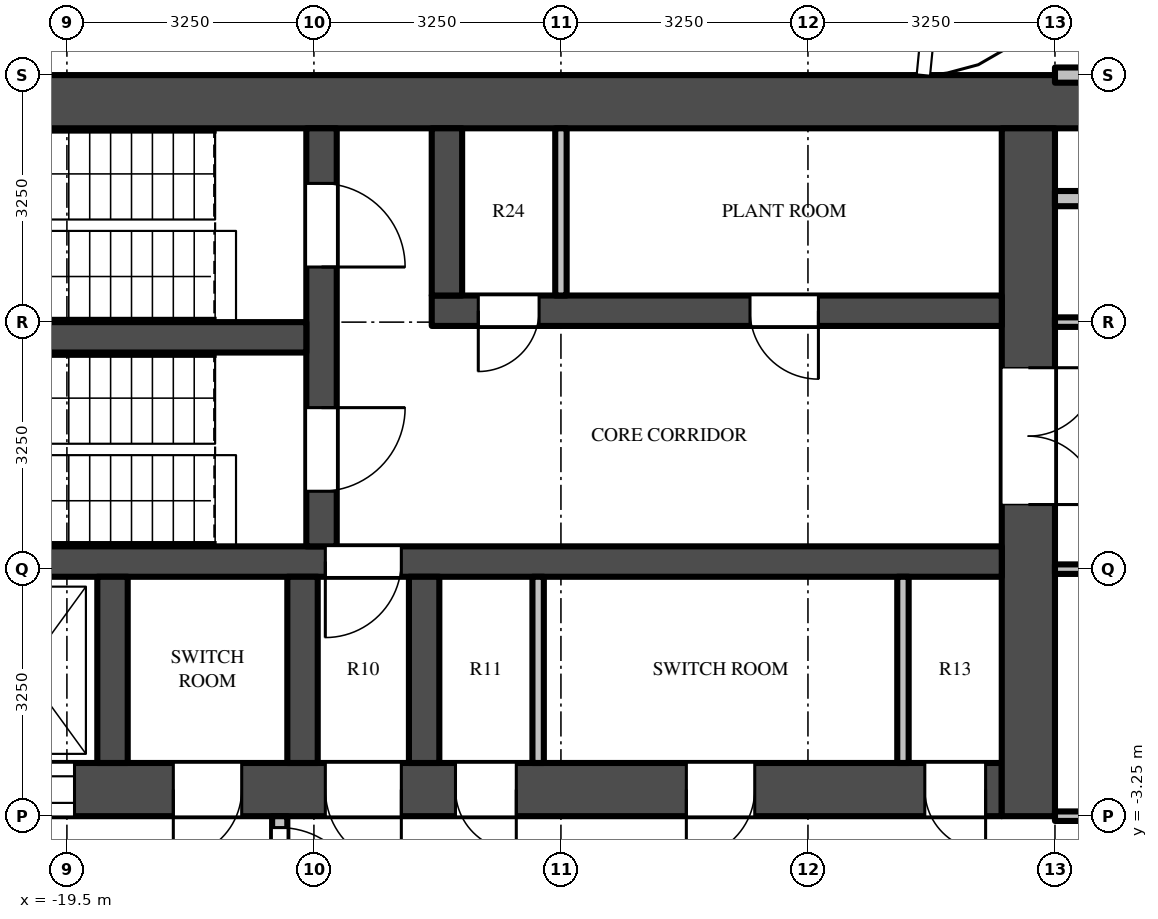
"""IFC4 building model, lengths in metres.
Left out: names, types, materials, properties, quantities, classifications, styles, units other than length and angle.
Written with IfcOpenShell. Run it as: python <this file> out.ifc"""

import sys

from ifc_helpers import new_model, si_unit, direction, frame, frame_2d, origin, place, context, subcontext, project, spatial, rectangle, extrude, source, transform, mapped, element, fill, save


model = new_model("IFC4")
c1 = context("Model", 3, precision=1e-05, world=origin(), true_north=direction((0.0, 1.0)))
c2 = subcontext(c1, "Body", "Model", "MODEL_VIEW")
j1 = project(units=[si_unit("LENGTHUNIT", "METRE"), si_unit("PLANEANGLEUNIT", "RADIAN")], contexts=[c1])
p1 = place(None, origin())
s1 = spatial("IfcSite", under=j1, at=p1, CompositionType="ELEMENT")
p2 = place(p1, origin())
s2 = spatial("IfcBuilding", under=s1, at=p2, CompositionType="ELEMENT")
p3 = place(p2, frame((0.0, 0.0, 342.1)))
s3 = spatial("IfcBuildingStorey", under=s2, at=p3, CompositionType="ELEMENT", Elevation=342.1)
m1 = source(origin(), c2, "Body", "SweptSolid", [
    extrude(rectangle(XDim=16.7, YDim=0.7, at=frame_2d((8.35, 0.0))), origin(), (0.0, 0.0, 1.0), 3.75),
])
p4 = place(p3, frame((-6.05, 6.15, 0.0), z_axis=(0.0, 0.0, 1.0), x_axis=(-1.0, 0.0, 0.0)))
e1 = element("IfcWall", 1, at=p4, inside=s3, PredefinedType="SHEAR", context=c2, shape_type="MappedRepresentation", body=[
    mapped(m1, transform((0.0, 0.0, 0.0))),
])
m2 = source(origin(), c2, "Body", "SweptSolid", [
    extrude(rectangle(XDim=14.85, YDim=0.7, at=frame_2d((7.425, 0.0))), origin(), (0.0, 0.0, 1.0), 3.75),
])
p5 = place(p3, frame((-7.2, -2.9, 0.0), z_axis=(0.0, 0.0, 1.0), x_axis=(-1.0, 0.0, 0.0)))
e2 = element("IfcWall", 2, at=p5, inside=s3, PredefinedType="SHEAR", context=c2, shape_type="MappedRepresentation", body=[
    mapped(m2, transform((0.0, 0.0, 0.0))),
])
m3 = source(origin(), c2, "Body", "SweptSolid", [
    extrude(rectangle(XDim=1.3, YDim=2.1, at=frame_2d((0.65, 1.05))), frame((0.0, 0.36, 0.0), z_axis=(0.0, -1.0, 0.0), x_axis=(1.0, 0.0, 0.0)), (0.0, 0.0, 1.0), 0.72),
])
p6 = place(p5, frame((12.2, 0.0, 0.0)))
e3 = element("IfcOpeningElement", 3, at=p6, cuts=e2, PredefinedType="OPENING", context=c2, shape_type="MappedRepresentation", body=[
    mapped(m3, transform((0.0, 0.0, 0.0))),
])
m4 = source(origin(), c2, "Body", "SweptSolid", [
    extrude(rectangle(XDim=1.0, YDim=2.1, at=frame_2d((0.5, 1.05))), frame((0.0, 0.36, 0.0), z_axis=(0.0, -1.0, 0.0), x_axis=(1.0, 0.0, 0.0)), (0.0, 0.0, 1.0), 0.72),
])
p7 = place(p5, frame((7.9, 0.0, 0.0)))
e4 = element("IfcOpeningElement", 4, at=p7, cuts=e2, PredefinedType="OPENING", context=c2, shape_type="MappedRepresentation", body=[
    mapped(m4, transform((0.0, 0.0, 0.0))),
])
m5 = source(origin(), c2, "Body", "SweptSolid", [
    extrude(rectangle(XDim=0.8, YDim=2.1, at=frame_2d((0.4, 1.05))), frame((0.0, 0.36, 0.0), z_axis=(0.0, -1.0, 0.0), x_axis=(1.0, 0.0, 0.0)), (0.0, 0.0, 1.0), 0.72),
])
p8 = place(p5, frame((0.212, 0.0, 0.0)))
e5 = element("IfcOpeningElement", 5, at=p8, cuts=e2, PredefinedType="OPENING", context=c2, shape_type="MappedRepresentation", body=[
    mapped(m5, transform((0.0, 0.0, 0.0))),
])
m6 = source(origin(), c2, "Body", "SweptSolid", [
    extrude(rectangle(XDim=0.9, YDim=2.1, at=frame_2d((0.45, 1.05))), frame((0.0, 0.36, 0.0), z_axis=(0.0, -1.0, 0.0), x_axis=(1.0, 0.0, 0.0)), (0.0, 0.0, 1.0), 0.72),
])
p9 = place(p5, frame((3.25, 0.0, 0.0)))
e6 = element("IfcOpeningElement", 6, at=p9, cuts=e2, PredefinedType="OPENING", context=c2, shape_type="MappedRepresentation", body=[
    mapped(m6, transform((0.0, 0.0, 0.0))),
])
p10 = place(p5, frame((6.387, 0.0, 0.0)))
e7 = element("IfcOpeningElement", 7, at=p10, cuts=e2, PredefinedType="OPENING", context=c2, shape_type="MappedRepresentation", body=[
    mapped(m5, transform((0.0, 0.0, 0.0))),
])
p11 = place(p5, frame((10.0, 0.0, 0.0)))
e8 = element("IfcOpeningElement", 8, at=p11, cuts=e2, PredefinedType="OPENING", context=c2, shape_type="MappedRepresentation", body=[
    mapped(m6, transform((0.0, 0.0, 0.0))),
])
m7 = source(origin(), c2, "Body", "SweptSolid", [
    extrude(rectangle(XDim=9.05, YDim=0.7, at=frame_2d((4.525, 0.0))), origin(), (0.0, 0.0, 1.0), 3.75),
])
p12 = place(p3, frame((-6.85, 5.8, 0.0), z_axis=(0.0, 0.0, 1.0), x_axis=(0.0, -1.0, 0.0)))
e9 = element("IfcWall", 9, at=p12, inside=s3, PredefinedType="SHEAR", context=c2, shape_type="MappedRepresentation", body=[
    mapped(m7, transform((0.0, 0.0, 0.0))),
])
m8 = source(origin(), c2, "Body", "SweptSolid", [
    extrude(rectangle(XDim=1.8, YDim=2.1, at=frame_2d((0.9, 1.05))), frame((0.0, 0.36, 0.0), z_axis=(0.0, -1.0, 0.0), x_axis=(1.0, 0.0, 0.0)), (0.0, 0.0, 1.0), 0.72),
])
p13 = place(p12, frame((3.15, 0.0, 0.0)))
e10 = element("IfcOpeningElement", 10, at=p13, cuts=e9, PredefinedType="OPENING", context=c2, shape_type="MappedRepresentation", body=[
    mapped(m8, transform((0.0, 0.0, 0.0))),
])
m9 = source(origin(), c2, "Body", "SweptSolid", [
    extrude(rectangle(XDim=7.5, YDim=0.4, at=frame_2d((3.75, 0.0))), origin(), (0.0, 0.0, 1.0), 3.75),
])
p14 = place(p3, frame((-7.2, 3.4, 0.0), z_axis=(0.0, 0.0, 1.0), x_axis=(-1.0, 0.0, 0.0)))
e11 = element("IfcWall", 11, at=p14, inside=s3, PredefinedType="SHEAR", context=c2, shape_type="MappedRepresentation", body=[
    mapped(m9, transform((0.0, 0.0, 0.0))),
])
m10 = source(origin(), c2, "Body", "SweptSolid", [
    extrude(rectangle(XDim=0.9, YDim=2.1, at=frame_2d((0.45, 1.05))), frame((0.0, 0.21, 0.0), z_axis=(0.0, -1.0, 0.0), x_axis=(1.0, 0.0, 0.0)), (0.0, 0.0, 1.0), 0.42),
])
p15 = place(p14, frame((2.413, 0.0, 0.0)))
e12 = element("IfcOpeningElement", 12, at=p15, cuts=e11, PredefinedType="OPENING", context=c2, shape_type="MappedRepresentation", body=[
    mapped(m10, transform((0.0, 0.0, 0.0))),
])
m11 = source(origin(), c2, "Body", "SweptSolid", [
    extrude(rectangle(XDim=0.8, YDim=2.1, at=frame_2d((0.4, 1.05))), frame((0.0, 0.21, 0.0), z_axis=(0.0, -1.0, 0.0), x_axis=(1.0, 0.0, 0.0)), (0.0, 0.0, 1.0), 0.42),
])
p16 = place(p14, frame((6.087, 0.0, 0.0)))
e13 = element("IfcOpeningElement", 13, at=p16, cuts=e11, PredefinedType="OPENING", context=c2, shape_type="MappedRepresentation", body=[
    mapped(m11, transform((0.0, 0.0, 0.0))),
])
m12 = source(origin(), c2, "Body", "SweptSolid", [
    extrude(rectangle(XDim=14.85, YDim=0.4, at=frame_2d((7.425, 0.0))), origin(), (0.0, 0.0, 1.0), 3.75),
])
p17 = place(p3, frame((-7.2, 0.1, 0.0), z_axis=(0.0, 0.0, 1.0), x_axis=(-1.0, 0.0, 0.0)))
e14 = element("IfcWall", 14, at=p17, inside=s3, PredefinedType="SHEAR", context=c2, shape_type="MappedRepresentation", body=[
    mapped(m12, transform((0.0, 0.0, 0.0))),
])
m13 = source(origin(), c2, "Body", "SweptSolid", [
    extrude(rectangle(XDim=1.0, YDim=2.1, at=frame_2d((0.5, 1.05))), frame((0.0, 0.21, 0.0), z_axis=(0.0, -1.0, 0.0), x_axis=(1.0, 0.0, 0.0)), (0.0, 0.0, 1.0), 0.42),
])
p18 = place(p17, frame((7.9, 0.0, 0.0)))
e15 = element("IfcOpeningElement", 15, at=p18, cuts=e14, PredefinedType="OPENING", context=c2, shape_type="MappedRepresentation", body=[
    mapped(m13, transform((0.0, 0.0, 0.0))),
])
m14 = source(origin(), c2, "Body", "SweptSolid", [
    extrude(rectangle(XDim=5.5, YDim=0.4, at=frame_2d((2.75, 0.0))), origin(), (0.0, 0.0, 1.0), 3.75),
])
p19 = place(p3, frame((-16.15, 5.8, 0.0), z_axis=(0.0, 0.0, 1.0), x_axis=(0.0, -1.0, 0.0)))
e16 = element("IfcWall", 16, at=p19, inside=s3, PredefinedType="SHEAR", context=c2, shape_type="MappedRepresentation", body=[
    mapped(m14, transform((0.0, 0.0, 0.0))),
])
m15 = source(origin(), c2, "Body", "SweptSolid", [
    extrude(rectangle(XDim=1.1, YDim=2.1, at=frame_2d((0.55, 1.05))), frame((0.0, 0.21, 0.0), z_axis=(0.0, -1.0, 0.0), x_axis=(1.0, 0.0, 0.0)), (0.0, 0.0, 1.0), 0.42),
])
p20 = place(p19, frame((0.725, 0.0, 0.0)))
e17 = element("IfcOpeningElement", 17, at=p20, cuts=e16, PredefinedType="OPENING", context=c2, shape_type="MappedRepresentation", body=[
    mapped(m15, transform((0.0, 0.0, 0.0))),
])
p21 = place(p19, frame((3.675, 0.0, 0.0)))
e18 = element("IfcOpeningElement", 18, at=p21, cuts=e16, PredefinedType="OPENING", context=c2, shape_type="MappedRepresentation", body=[
    mapped(m15, transform((0.0, 0.0, 0.0))),
])
m16 = source(origin(), c2, "Body", "SweptSolid", [
    extrude(rectangle(XDim=5.7, YDim=0.4, at=frame_2d((2.85, 0.0))), origin(), (0.0, 0.0, 1.0), 3.75),
])
p22 = place(p3, frame((-16.35, 3.05, 0.0), z_axis=(0.0, 0.0, 1.0), x_axis=(-1.0, 0.0, 0.0)))
e19 = element("IfcWall", 19, at=p22, inside=s3, PredefinedType="SHEAR", context=c2, shape_type="MappedRepresentation", body=[
    mapped(m16, transform((0.0, 0.0, 0.0))),
])
m17 = source(origin(), c2, "Body", "SweptSolid", [
    extrude(rectangle(XDim=2.2, YDim=0.4, at=frame_2d((1.1, 0.0))), origin(), (0.0, 0.0, 1.0), 3.75),
])
p23 = place(p3, frame((-14.5, 5.8, 0.0), z_axis=(0.0, 0.0, 1.0), x_axis=(0.0, -1.0, 0.0)))
e20 = element("IfcWall", 20, at=p23, inside=s3, PredefinedType="SHEAR", context=c2, shape_type="MappedRepresentation", body=[
    mapped(m17, transform((0.0, 0.0, 0.0))),
])
m18 = source(origin(), c2, "Body", "SweptSolid", [
    extrude(rectangle(XDim=2.45, YDim=0.4, at=frame_2d((1.225, 0.0))), origin(), (0.0, 0.0, 1.0), 3.75),
])
for number, where, z_axis, x_axis in (
    (21, (-14.8, -0.1, 0.0), (0.0, 0.0, 1.0), (0.0, -1.0, 0.0)),
    (22, (-16.4, -0.1, 0.0), (0.0, 0.0, 1.0), (0.0, -1.0, 0.0)),
    (23, (-18.9, -0.1, 0.0), (0.0, 0.0, 1.0), (0.0, -1.0, 0.0)),
):
    element("IfcWall", number, at=place(p3, frame(where, z_axis=z_axis, x_axis=x_axis)), inside=s3, PredefinedType="SHEAR", context=c2, shape_type="MappedRepresentation", body=[
        mapped(m18, transform((0.0, 0.0, 0.0))),
    ])
m19 = source(origin(), c2, "Body", "SweptSolid", [
    extrude(rectangle(XDim=3.25, YDim=0.2, at=frame_2d((1.625, 0.0))), origin(), (0.0, 0.0, 1.0), 3.75),
])
p24 = place(p3, frame((-16.7, -3.25, 0.0), z_axis=(0.0, 0.0, 1.0), x_axis=(0.0, -1.0, 0.0)))
e24 = element("IfcWall", 24, at=p24, inside=s3, PredefinedType="PARTITIONING", context=c2, shape_type="MappedRepresentation", body=[
    mapped(m19, transform((0.0, 0.0, 0.0))),
])
m20 = source(origin(), c2, "Body", "SweptSolid", [
    extrude(rectangle(XDim=1.1, YDim=2.1, at=frame_2d((0.55, 1.05))), frame((0.0, 0.11, 0.0), z_axis=(0.0, -1.0, 0.0), x_axis=(1.0, 0.0, 0.0)), (0.0, 0.0, 1.0), 0.22),
])
p25 = place(p24, frame((0.15, 0.0, 0.0)))
e25 = element("IfcOpeningElement", 25, at=p25, cuts=e24, PredefinedType="OPENING", context=c2, shape_type="MappedRepresentation", body=[
    mapped(m20, transform((0.0, 0.0, 0.0))),
])
m21 = source(origin(), c2, "Body", "SweptSolid", [
    extrude(rectangle(XDim=2.2, YDim=0.15, at=frame_2d((1.1, 0.0))), origin(), (0.0, 0.0, 1.0), 3.75),
])
p26 = place(p3, frame((-13.0, 5.8, 0.0), z_axis=(0.0, 0.0, 1.0), x_axis=(0.0, -1.0, 0.0)))
e26 = element("IfcWall", 26, at=p26, inside=s3, PredefinedType="PARTITIONING", context=c2, shape_type="MappedRepresentation", body=[
    mapped(m21, transform((0.0, 0.0, 0.0))),
])
m22 = source(origin(), c2, "Body", "SweptSolid", [
    extrude(rectangle(XDim=2.45, YDim=0.15, at=frame_2d((1.225, 0.0))), origin(), (0.0, 0.0, 1.0), 3.75),
])
for number, where, z_axis, x_axis in (
    (27, (-8.5, -0.1, 0.0), (0.0, 0.0, 1.0), (0.0, -1.0, 0.0)),
    (28, (-13.3, -0.1, 0.0), (0.0, 0.0, 1.0), (0.0, -1.0, 0.0)),
):
    element("IfcWall", number, at=place(p3, frame(where, z_axis=z_axis, x_axis=x_axis)), inside=s3, PredefinedType="PARTITIONING", context=c2, shape_type="MappedRepresentation", body=[
        mapped(m22, transform((0.0, 0.0, 0.0))),
    ])
m23 = source(origin(), c2, "Body", "SweptSolid", [
    extrude(rectangle(XDim=5.363, YDim=0.125, at=frame_2d((2.681, 0.0))), origin(), (0.0, 0.0, 1.0), 3.046),
])
p27 = place(p3, frame((-1.137, -3.25, 0.0), z_axis=(0.0, 0.0, 1.0), x_axis=(-1.0, 0.0, 0.0)))
e29 = element("IfcWall", 29, at=p27, inside=s3, PredefinedType="PARTITIONING", context=c2, shape_type="MappedRepresentation", body=[
    mapped(m23, transform((0.0, 0.0, 0.0))),
])
m24 = source(origin(), c2, "Body", "SweptSolid", [
    extrude(rectangle(XDim=1.0, YDim=2.1, at=frame_2d((0.5, 1.05))), frame((0.0, 0.073, 0.0), z_axis=(0.0, -1.0, 0.0), x_axis=(1.0, 0.0, 0.0)), (0.0, 0.0, 1.0), 0.145),
])
p28 = place(p27, frame((4.012, 0.0, 0.0)))
e30 = element("IfcOpeningElement", 30, at=p28, cuts=e29, PredefinedType="OPENING", context=c2, shape_type="MappedRepresentation", body=[
    mapped(m24, transform((0.0, 0.0, 0.0))),
])
p29 = place(p3, frame((-1.137, 0.0, 0.0), z_axis=(0.0, 0.0, 1.0), x_axis=(-1.0, 0.0, 0.0)))
e31 = element("IfcWall", 31, at=p29, inside=s3, PredefinedType="PARTITIONING", context=c2, shape_type="MappedRepresentation", body=[
    mapped(m23, transform((0.0, 0.0, 0.0))),
])
p30 = place(p3, frame((-6.5, 3.25, 0.0), z_axis=(0.0, 0.0, 1.0), x_axis=(1.0, 0.0, 0.0)))
e32 = element("IfcWall", 32, at=p30, inside=s3, PredefinedType="PARTITIONING", context=c2, shape_type="MappedRepresentation", body=[
    mapped(m23, transform((0.0, 0.0, 0.0))),
])
p31 = place(p30, frame((3.95, 0.0, 0.0)))
e33 = element("IfcOpeningElement", 33, at=p31, cuts=e32, PredefinedType="OPENING", context=c2, shape_type="MappedRepresentation", body=[
    mapped(m24, transform((0.0, 0.0, 0.0))),
])
m25 = source(origin(), c2, "Body", "SweptSolid", [
    extrude(rectangle(XDim=5.238, YDim=0.2, at=frame_2d((2.619, 0.0))), origin(), (0.0, 0.0, 1.0), 3.046),
])
p32 = place(p3, frame((-6.5, 4.875, 0.0), z_axis=(0.0, 0.0, 1.0), x_axis=(1.0, 0.0, 0.0)))
e34 = element("IfcWall", 34, at=p32, inside=s3, PredefinedType="PARTITIONING", context=c2, shape_type="MappedRepresentation", body=[
    mapped(m25, transform((0.0, 0.0, 0.0))),
])
m26 = source(origin(), c2, "Body", "SweptSolid", [
    extrude(rectangle(XDim=5.363, YDim=0.2, at=frame_2d((2.681, 0.0))), origin(), (0.0, 0.0, 1.0), 3.75),
])
p33 = place(p3, frame((-6.5, 6.5, 0.0), z_axis=(0.0, 0.0, 1.0), x_axis=(1.0, 0.0, 0.0)))
e35 = element("IfcWall", 35, at=p33, inside=s3, PredefinedType="PARTITIONING", context=c2, shape_type="MappedRepresentation", body=[
    mapped(m26, transform((0.0, 0.0, 0.0))),
])
m27 = source(origin(), c2, "Body", "SweptSolid", [
    extrude(rectangle(XDim=1.3, YDim=2.1, at=frame_2d((0.65, 1.05))), frame((0.0, -0.275, 0.0), z_axis=(0.0, -1.0, 0.0), x_axis=(1.0, 0.0, 0.0)), (0.0, 0.0, 1.0), 0.05),
])
p34 = place(p6, origin())
e36 = element("IfcDoor", 36, at=p34, inside=s3, OperationType="DOUBLE_DOOR_SLIDING", PredefinedType="DOOR", context=c2, shape_type="MappedRepresentation", body=[
    mapped(m27, transform((0.0, 0.0, 0.0))),
])
fill(e3, e36)
m28 = source(origin(), c2, "Body", "SweptSolid", [
    extrude(rectangle(XDim=1.8, YDim=2.1, at=frame_2d((0.9, 1.05))), frame((0.0, -0.275, 0.0), z_axis=(0.0, -1.0, 0.0), x_axis=(1.0, 0.0, 0.0)), (0.0, 0.0, 1.0), 0.05),
])
p35 = place(p13, origin())
e37 = element("IfcDoor", 37, at=p35, inside=s3, OperationType="DOUBLE_DOOR_SINGLE_SWING", PredefinedType="DOOR", context=c2, shape_type="MappedRepresentation", body=[
    mapped(m28, transform((0.0, 0.0, 0.0))),
])
fill(e10, e37)
m29 = source(origin(), c2, "Body", "SweptSolid", [
    extrude(rectangle(XDim=1.1, YDim=2.1, at=frame_2d((0.55, 1.05))), frame((0.0, 0.025, 0.0), z_axis=(0.0, -1.0, 0.0), x_axis=(1.0, 0.0, 0.0)), (0.0, 0.0, 1.0), 0.05),
])
p36 = place(p20, origin())
e38 = element("IfcDoor", 38, at=p36, inside=s3, OperationType="SINGLE_SWING_RIGHT", PredefinedType="DOOR", context=c2, shape_type="MappedRepresentation", body=[
    mapped(m29, transform((0.0, 0.0, 0.0))),
])
fill(e17, e38)
p37 = place(p21, origin())
e39 = element("IfcDoor", 39, at=p37, inside=s3, OperationType="SINGLE_SWING_LEFT", PredefinedType="DOOR", context=c2, shape_type="MappedRepresentation", body=[
    mapped(m29, transform((0.0, 0.0, 0.0))),
])
fill(e18, e39)
m30 = source(origin(), c2, "Body", "SweptSolid", [
    extrude(rectangle(XDim=1.0, YDim=2.1, at=frame_2d((0.5, 1.05))), frame((0.0, 0.025, 0.0), z_axis=(0.0, -1.0, 0.0), x_axis=(1.0, 0.0, 0.0)), (0.0, 0.0, 1.0), 0.05),
])
p38 = place(p18, origin())
e40 = element("IfcDoor", 40, at=p38, inside=s3, OperationType="SINGLE_SWING_RIGHT", PredefinedType="DOOR", context=c2, shape_type="MappedRepresentation", body=[
    mapped(m30, transform((0.0, 0.0, 0.0))),
])
fill(e15, e40)
m31 = source(origin(), c2, "Body", "SweptSolid", [
    extrude(rectangle(XDim=1.0, YDim=2.1, at=frame_2d((0.5, 1.05))), frame((0.0, -0.275, 0.0), z_axis=(0.0, -1.0, 0.0), x_axis=(1.0, 0.0, 0.0)), (0.0, 0.0, 1.0), 0.05),
])
p39 = place(p7, origin())
e41 = element("IfcDoor", 41, at=p39, inside=s3, OperationType="SINGLE_SWING_LEFT", PredefinedType="DOOR", context=c2, shape_type="MappedRepresentation", body=[
    mapped(m31, transform((0.0, 0.0, 0.0))),
])
fill(e4, e41)
p40 = place(p25, origin())
e42 = element("IfcDoor", 42, at=p40, inside=s3, OperationType="SINGLE_SWING_RIGHT", PredefinedType="DOOR", context=c2, shape_type="MappedRepresentation", body=[
    mapped(m29, transform((0.0, 0.0, 0.0))),
])
fill(e25, e42)
m32 = source(origin(), c2, "Body", "SweptSolid", [
    extrude(rectangle(XDim=0.9, YDim=2.1, at=frame_2d((0.45, 1.05))), frame((0.0, 0.025, 0.0), z_axis=(0.0, -1.0, 0.0), x_axis=(1.0, 0.0, 0.0)), (0.0, 0.0, 1.0), 0.05),
])
p41 = place(p15, origin())
e43 = element("IfcDoor", 43, at=p41, inside=s3, OperationType="SINGLE_SWING_LEFT", PredefinedType="DOOR", context=c2, shape_type="MappedRepresentation", body=[
    mapped(m32, transform((0.0, 0.0, 0.0))),
])
fill(e12, e43)
m33 = source(origin(), c2, "Body", "SweptSolid", [
    extrude(rectangle(XDim=0.8, YDim=2.1, at=frame_2d((0.4, 1.05))), frame((0.0, 0.025, 0.0), z_axis=(0.0, -1.0, 0.0), x_axis=(1.0, 0.0, 0.0)), (0.0, 0.0, 1.0), 0.05),
])
p42 = place(p16, origin())
e44 = element("IfcDoor", 44, at=p42, inside=s3, OperationType="SINGLE_SWING_RIGHT", PredefinedType="DOOR", context=c2, shape_type="MappedRepresentation", body=[
    mapped(m33, transform((0.0, 0.0, 0.0))),
])
fill(e13, e44)
m34 = source(origin(), c2, "Body", "SweptSolid", [
    extrude(rectangle(XDim=0.8, YDim=2.1, at=frame_2d((0.4, 1.05))), frame((0.0, -0.275, 0.0), z_axis=(0.0, -1.0, 0.0), x_axis=(1.0, 0.0, 0.0)), (0.0, 0.0, 1.0), 0.05),
])
p43 = place(p8, origin())
e45 = element("IfcDoor", 45, at=p43, inside=s3, OperationType="SINGLE_SWING_LEFT", PredefinedType="DOOR", context=c2, shape_type="MappedRepresentation", body=[
    mapped(m34, transform((0.0, 0.0, 0.0))),
])
fill(e5, e45)
m35 = source(origin(), c2, "Body", "SweptSolid", [
    extrude(rectangle(XDim=0.9, YDim=2.1, at=frame_2d((0.45, 1.05))), frame((0.0, -0.275, 0.0), z_axis=(0.0, -1.0, 0.0), x_axis=(1.0, 0.0, 0.0)), (0.0, 0.0, 1.0), 0.05),
])
p44 = place(p9, origin())
e46 = element("IfcDoor", 46, at=p44, inside=s3, OperationType="SINGLE_SWING_RIGHT", PredefinedType="DOOR", context=c2, shape_type="MappedRepresentation", body=[
    mapped(m35, transform((0.0, 0.0, 0.0))),
])
fill(e6, e46)
p45 = place(p10, origin())
e47 = element("IfcDoor", 47, at=p45, inside=s3, OperationType="SINGLE_SWING_LEFT", PredefinedType="DOOR", context=c2, shape_type="MappedRepresentation", body=[
    mapped(m34, transform((0.0, 0.0, 0.0))),
])
fill(e7, e47)
p46 = place(p11, origin())
e48 = element("IfcDoor", 48, at=p46, inside=s3, OperationType="SINGLE_SWING_RIGHT", PredefinedType="DOOR", context=c2, shape_type="MappedRepresentation", body=[
    mapped(m35, transform((0.0, 0.0, 0.0))),
])
fill(e8, e48)
save(model, sys.argv[1])
